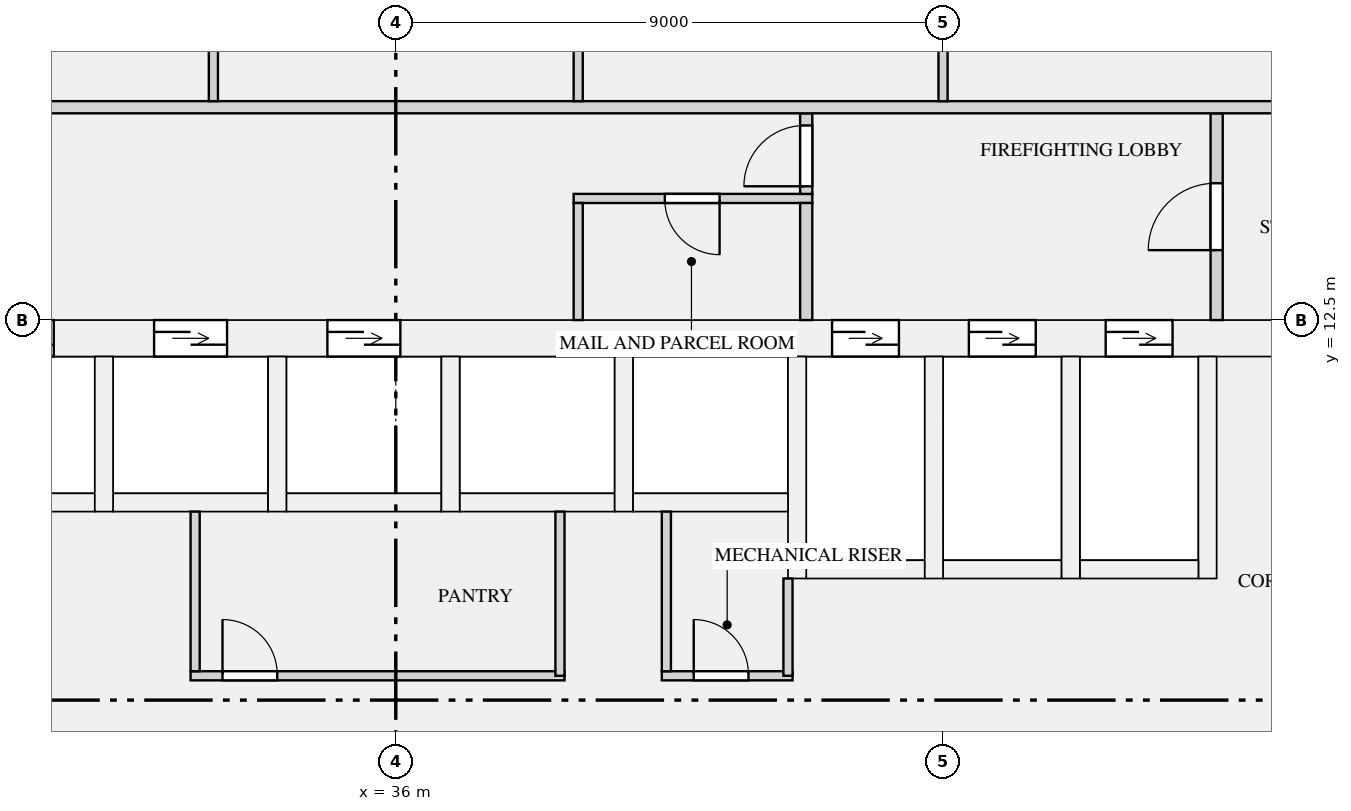
"""IFC4 building model, lengths in metres.
Left out: names, types, materials, properties, quantities, classifications, styles, units other than length and angle.
Written with IfcOpenShell. Run it as: python <this file> out.ifc"""

import sys

from ifc_helpers import new_model, si_unit, direction, frame, frame_2d, origin, place, context, subcontext, project, spatial, rectangle, extrude, element, fill, save


model = new_model("IFC4")
c1 = context("Model", 3, precision=1e-05, world=origin(), true_north=direction((0.0, 1.0)))
c2 = subcontext(c1, "Body", "Model", "MODEL_VIEW")
j1 = project(units=[si_unit("LENGTHUNIT", "METRE"), si_unit("PLANEANGLEUNIT", "RADIAN")], contexts=[c1])
p1 = place(None, origin())
s1 = spatial("IfcSite", under=j1, at=p1, CompositionType="ELEMENT")
p2 = place(p1, origin())
s2 = spatial("IfcBuilding", under=s1, at=p2, CompositionType="ELEMENT")
p3 = place(p2, frame((0.0, 0.0, 19.5)))
s3 = spatial("IfcBuildingStorey", under=s2, at=p3, CompositionType="ELEMENT", Elevation=19.5)
p4 = place(p3, frame((19.0, 12.2, 0.0), z_axis=(0.0, 0.0, 1.0), x_axis=(1.0, 0.0, 0.0)))
e1 = element("IfcWall", 1, at=p4, inside=s3, PredefinedType="SHEAR", context=c2, shape_type="SweptSolid", body=[
    extrude(rectangle(XDim=34.0, YDim=0.6, at=frame_2d((17.0, 0.0))), origin(), (0.0, 0.0, 1.0), 3.15),
])
p5 = place(p4, frame((4.475, 0.0, 0.0)))
e2 = element("IfcOpeningElement", 2, at=p5, cuts=e1, PredefinedType="OPENING", context=c2, shape_type="SweptSolid", body=[
    extrude(rectangle(XDim=1.2, YDim=2.1, at=frame_2d((0.6, 1.05))), frame((0.0, 0.31, 0.0), z_axis=(0.0, -1.0, 0.0), x_axis=(1.0, 0.0, 0.0)), (0.0, 0.0, 1.0), 0.62),
])
p6 = place(p4, frame((7.325, 0.0, 0.0)))
e3 = element("IfcOpeningElement", 3, at=p6, cuts=e1, PredefinedType="OPENING", context=c2, shape_type="SweptSolid", body=[
    extrude(rectangle(XDim=1.2, YDim=2.1, at=frame_2d((0.6, 1.05))), frame((0.0, 0.31, 0.0), z_axis=(0.0, -1.0, 0.0), x_axis=(1.0, 0.0, 0.0)), (0.0, 0.0, 1.0), 0.62),
])
p7 = place(p4, frame((10.175, 0.0, 0.0)))
e4 = element("IfcOpeningElement", 4, at=p7, cuts=e1, PredefinedType="OPENING", context=c2, shape_type="SweptSolid", body=[
    extrude(rectangle(XDim=1.2, YDim=2.1, at=frame_2d((0.6, 1.05))), frame((0.0, 0.31, 0.0), z_axis=(0.0, -1.0, 0.0), x_axis=(1.0, 0.0, 0.0)), (0.0, 0.0, 1.0), 0.62),
])
p8 = place(p4, frame((13.025, 0.0, 0.0)))
e5 = element("IfcOpeningElement", 5, at=p8, cuts=e1, PredefinedType="OPENING", context=c2, shape_type="SweptSolid", body=[
    extrude(rectangle(XDim=1.2, YDim=2.1, at=frame_2d((0.6, 1.05))), frame((0.0, 0.31, 0.0), z_axis=(0.0, -1.0, 0.0), x_axis=(1.0, 0.0, 0.0)), (0.0, 0.0, 1.0), 0.62),
])
p9 = place(p4, frame((15.875, 0.0, 0.0)))
e6 = element("IfcOpeningElement", 6, at=p9, cuts=e1, PredefinedType="OPENING", context=c2, shape_type="SweptSolid", body=[
    extrude(rectangle(XDim=1.2, YDim=2.1, at=frame_2d((0.6, 1.05))), frame((0.0, 0.31, 0.0), z_axis=(0.0, -1.0, 0.0), x_axis=(1.0, 0.0, 0.0)), (0.0, 0.0, 1.0), 0.62),
])
p10 = place(p4, frame((24.175, 0.0, 0.0)))
e7 = element("IfcOpeningElement", 7, at=p10, cuts=e1, PredefinedType="OPENING", context=c2, shape_type="SweptSolid", body=[
    extrude(rectangle(XDim=1.1, YDim=2.1, at=frame_2d((0.55, 1.05))), frame((0.0, 0.31, 0.0), z_axis=(0.0, -1.0, 0.0), x_axis=(1.0, 0.0, 0.0)), (0.0, 0.0, 1.0), 0.62),
])
p11 = place(p4, frame((26.425, 0.0, 0.0)))
e8 = element("IfcOpeningElement", 8, at=p11, cuts=e1, PredefinedType="OPENING", context=c2, shape_type="SweptSolid", body=[
    extrude(rectangle(XDim=1.1, YDim=2.1, at=frame_2d((0.55, 1.05))), frame((0.0, 0.31, 0.0), z_axis=(0.0, -1.0, 0.0), x_axis=(1.0, 0.0, 0.0)), (0.0, 0.0, 1.0), 0.62),
])
p12 = place(p4, frame((28.675, 0.0, 0.0)))
e9 = element("IfcOpeningElement", 9, at=p12, cuts=e1, PredefinedType="OPENING", context=c2, shape_type="SweptSolid", body=[
    extrude(rectangle(XDim=1.1, YDim=2.1, at=frame_2d((0.55, 1.05))), frame((0.0, 0.31, 0.0), z_axis=(0.0, -1.0, 0.0), x_axis=(1.0, 0.0, 0.0)), (0.0, 0.0, 1.0), 0.62),
])
p13 = place(p4, frame((1.15, 0.0, 0.0)))
e10 = element("IfcOpeningElement", 10, at=p13, cuts=e1, PredefinedType="OPENING", context=c2, shape_type="SweptSolid", body=[
    extrude(rectangle(XDim=1.2, YDim=2.1, at=frame_2d((0.6, 1.05))), frame((0.0, 0.31, 0.0), z_axis=(0.0, -1.0, 0.0), x_axis=(1.0, 0.0, 0.0)), (0.0, 0.0, 1.0), 0.62),
])
p14 = place(p4, frame((31.65, 0.0, 0.0)))
e11 = element("IfcOpeningElement", 11, at=p14, cuts=e1, PredefinedType="OPENING", context=c2, shape_type="SweptSolid", body=[
    extrude(rectangle(XDim=1.2, YDim=2.1, at=frame_2d((0.6, 1.05))), frame((0.0, 0.31, 0.0), z_axis=(0.0, -1.0, 0.0), x_axis=(1.0, 0.0, 0.0)), (0.0, 0.0, 1.0), 0.62),
])
p15 = place(p3, frame((28.5, 9.5, 0.0), z_axis=(0.0, 0.0, 1.0), x_axis=(1.0, 0.0, 0.0)))
e12 = element("IfcWall", 12, at=p15, inside=s3, PredefinedType="SHEAR", context=c2, shape_type="SweptSolid", body=[
    extrude(rectangle(XDim=2.55, YDim=0.3, at=frame_2d((1.275, 0.0))), origin(), (0.0, 0.0, 1.0), 3.15),
])
for number, where, z_axis, x_axis in (
    (13, (31.35, 9.5, 0.0), (0.0, 0.0, 1.0), (1.0, 0.0, 0.0)),
    (14, (31.2, 9.35, 0.0), (0.0, 0.0, 1.0), (0.0, 1.0, 0.0)),
):
    element("IfcWall", number, at=place(p3, frame(where, z_axis=z_axis, x_axis=x_axis)), inside=s3, PredefinedType="SHEAR", context=c2, shape_type="SweptSolid", body=[
        extrude(rectangle(XDim=2.55, YDim=0.3, at=frame_2d((1.275, 0.0))), origin(), (0.0, 0.0, 1.0), 3.15),
    ])
p16 = place(p3, frame((34.2, 9.5, 0.0), z_axis=(0.0, 0.0, 1.0), x_axis=(1.0, 0.0, 0.0)))
e15 = element("IfcWall", 15, at=p16, inside=s3, PredefinedType="SHEAR", context=c2, shape_type="SweptSolid", body=[
    extrude(rectangle(XDim=2.55, YDim=0.3, at=frame_2d((1.275, 0.0))), origin(), (0.0, 0.0, 1.0), 3.15),
])
p17 = place(p3, frame((34.05, 9.35, 0.0), z_axis=(0.0, 0.0, 1.0), x_axis=(0.0, 1.0, 0.0)))
e16 = element("IfcWall", 16, at=p17, inside=s3, PredefinedType="SHEAR", context=c2, shape_type="SweptSolid", body=[
    extrude(rectangle(XDim=2.55, YDim=0.3, at=frame_2d((1.275, 0.0))), origin(), (0.0, 0.0, 1.0), 3.15),
])
p18 = place(p3, frame((37.05, 9.5, 0.0), z_axis=(0.0, 0.0, 1.0), x_axis=(1.0, 0.0, 0.0)))
e17 = element("IfcWall", 17, at=p18, inside=s3, PredefinedType="SHEAR", context=c2, shape_type="SweptSolid", body=[
    extrude(rectangle(XDim=2.55, YDim=0.3, at=frame_2d((1.275, 0.0))), origin(), (0.0, 0.0, 1.0), 3.15),
])
p19 = place(p3, frame((36.9, 9.35, 0.0), z_axis=(0.0, 0.0, 1.0), x_axis=(0.0, 1.0, 0.0)))
e18 = element("IfcWall", 18, at=p19, inside=s3, PredefinedType="SHEAR", context=c2, shape_type="SweptSolid", body=[
    extrude(rectangle(XDim=2.55, YDim=0.3, at=frame_2d((1.275, 0.0))), origin(), (0.0, 0.0, 1.0), 3.15),
])
p20 = place(p3, frame((39.9, 9.5, 0.0), z_axis=(0.0, 0.0, 1.0), x_axis=(1.0, 0.0, 0.0)))
e19 = element("IfcWall", 19, at=p20, inside=s3, PredefinedType="SHEAR", context=c2, shape_type="SweptSolid", body=[
    extrude(rectangle(XDim=2.55, YDim=0.3, at=frame_2d((1.275, 0.0))), origin(), (0.0, 0.0, 1.0), 3.15),
])
p21 = place(p3, frame((39.75, 9.35, 0.0), z_axis=(0.0, 0.0, 1.0), x_axis=(0.0, 1.0, 0.0)))
e20 = element("IfcWall", 20, at=p21, inside=s3, PredefinedType="SHEAR", context=c2, shape_type="SweptSolid", body=[
    extrude(rectangle(XDim=2.55, YDim=0.3, at=frame_2d((1.275, 0.0))), origin(), (0.0, 0.0, 1.0), 3.15),
])
p22 = place(p3, frame((42.75, 8.4, 0.0), z_axis=(0.0, 0.0, 1.0), x_axis=(1.0, 0.0, 0.0)))
e21 = element("IfcWall", 21, at=p22, inside=s3, PredefinedType="SHEAR", context=c2, shape_type="SweptSolid", body=[
    extrude(rectangle(XDim=1.95, YDim=0.3, at=frame_2d((0.975, 0.0))), origin(), (0.0, 0.0, 1.0), 3.15),
])
p23 = place(p3, frame((42.6, 8.25, 0.0), z_axis=(0.0, 0.0, 1.0), x_axis=(0.0, 1.0, 0.0)))
e22 = element("IfcWall", 22, at=p23, inside=s3, PredefinedType="SHEAR", context=c2, shape_type="SweptSolid", body=[
    extrude(rectangle(XDim=3.65, YDim=0.3, at=frame_2d((1.825, 0.0))), origin(), (0.0, 0.0, 1.0), 3.15),
])
p24 = place(p3, frame((45.0, 8.4, 0.0), z_axis=(0.0, 0.0, 1.0), x_axis=(1.0, 0.0, 0.0)))
e23 = element("IfcWall", 23, at=p24, inside=s3, PredefinedType="SHEAR", context=c2, shape_type="SweptSolid", body=[
    extrude(rectangle(XDim=1.95, YDim=0.3, at=frame_2d((0.975, 0.0))), origin(), (0.0, 0.0, 1.0), 3.15),
])
p25 = place(p3, frame((44.85, 8.25, 0.0), z_axis=(0.0, 0.0, 1.0), x_axis=(0.0, 1.0, 0.0)))
e24 = element("IfcWall", 24, at=p25, inside=s3, PredefinedType="SHEAR", context=c2, shape_type="SweptSolid", body=[
    extrude(rectangle(XDim=3.65, YDim=0.3, at=frame_2d((1.825, 0.0))), origin(), (0.0, 0.0, 1.0), 3.15),
])
p26 = place(p3, frame((47.25, 8.4, 0.0), z_axis=(0.0, 0.0, 1.0), x_axis=(1.0, 0.0, 0.0)))
e25 = element("IfcWall", 25, at=p26, inside=s3, PredefinedType="SHEAR", context=c2, shape_type="SweptSolid", body=[
    extrude(rectangle(XDim=1.95, YDim=0.3, at=frame_2d((0.975, 0.0))), origin(), (0.0, 0.0, 1.0), 3.15),
])
for number, where, z_axis, x_axis in (
    (26, (47.1, 8.25, 0.0), (0.0, 0.0, 1.0), (0.0, 1.0, 0.0)),
    (27, (49.35, 8.25, 0.0), (0.0, 0.0, 1.0), (0.0, 1.0, 0.0)),
):
    element("IfcWall", number, at=place(p3, frame(where, z_axis=z_axis, x_axis=x_axis)), inside=s3, PredefinedType="SHEAR", context=c2, shape_type="SweptSolid", body=[
        extrude(rectangle(XDim=3.65, YDim=0.3, at=frame_2d((1.825, 0.0))), origin(), (0.0, 0.0, 1.0), 3.15),
    ])
p27 = place(p3, frame((32.625, 6.65, 0.0), z_axis=(0.0, 0.0, 1.0), x_axis=(1.0, 0.0, 0.0)))
e28 = element("IfcWall", 28, at=p27, inside=s3, PredefinedType="PARTITIONING", context=c2, shape_type="SweptSolid", body=[
    extrude(rectangle(XDim=6.15, YDim=0.15, at=frame_2d((3.075, 0.0))), origin(), (0.0, 0.0, 1.0), 2.83),
])
p28 = place(p27, frame((0.525, 0.0, 0.0)))
e29 = element("IfcOpeningElement", 29, at=p28, cuts=e28, PredefinedType="OPENING", context=c2, shape_type="SweptSolid", body=[
    extrude(rectangle(XDim=0.9, YDim=2.1, at=frame_2d((0.45, 1.05))), frame((0.0, 0.085, 0.0), z_axis=(0.0, -1.0, 0.0), x_axis=(1.0, 0.0, 0.0)), (0.0, 0.0, 1.0), 0.17),
])
p29 = place(p3, frame((40.375, 6.65, 0.0), z_axis=(0.0, 0.0, 1.0), x_axis=(1.0, 0.0, 0.0)))
e30 = element("IfcWall", 30, at=p29, inside=s3, PredefinedType="PARTITIONING", context=c2, shape_type="SweptSolid", body=[
    extrude(rectangle(XDim=2.15, YDim=0.15, at=frame_2d((1.075, 0.0))), origin(), (0.0, 0.0, 1.0), 2.83),
])
p30 = place(p29, frame((0.525, 0.0, 0.0)))
e31 = element("IfcOpeningElement", 31, at=p30, cuts=e30, PredefinedType="OPENING", context=c2, shape_type="SweptSolid", body=[
    extrude(rectangle(XDim=0.9, YDim=2.1, at=frame_2d((0.45, 1.05))), frame((0.0, 0.085, 0.0), z_axis=(0.0, -1.0, 0.0), x_axis=(1.0, 0.0, 0.0)), (0.0, 0.0, 1.0), 0.17),
])
p31 = place(p3, frame((38.925, 14.5, 0.0), z_axis=(0.0, 0.0, 1.0), x_axis=(1.0, 0.0, 0.0)))
e32 = element("IfcWall", 32, at=p31, inside=s3, PredefinedType="PARTITIONING", context=c2, shape_type="SweptSolid", body=[
    extrude(rectangle(XDim=3.925, YDim=0.15, at=frame_2d((1.962, 0.0))), origin(), (0.0, 0.0, 1.0), 2.83),
])
p32 = place(p31, frame((1.5, 0.0, 0.0)))
e33 = element("IfcOpeningElement", 33, at=p32, cuts=e32, PredefinedType="OPENING", context=c2, shape_type="SweptSolid", body=[
    extrude(rectangle(XDim=0.9, YDim=2.1, at=frame_2d((0.45, 1.05))), frame((0.0, 0.085, 0.0), z_axis=(0.0, -1.0, 0.0), x_axis=(1.0, 0.0, 0.0)), (0.0, 0.0, 1.0), 0.17),
])
p33 = place(p3, frame((38.7, 6.65, 0.0), z_axis=(0.0, 0.0, 1.0), x_axis=(0.0, 1.0, 0.0)))
e34 = element("IfcWall", 34, at=p33, inside=s3, PredefinedType="PARTITIONING", context=c2, shape_type="SweptSolid", body=[
    extrude(rectangle(XDim=2.7, YDim=0.15, at=frame_2d((1.35, 0.0))), origin(), (0.0, 0.0, 1.0), 2.83),
])
p34 = place(p3, frame((42.45, 6.65, 0.0), z_axis=(0.0, 0.0, 1.0), x_axis=(0.0, 1.0, 0.0)))
e35 = element("IfcWall", 35, at=p34, inside=s3, PredefinedType="PARTITIONING", context=c2, shape_type="SweptSolid", body=[
    extrude(rectangle(XDim=1.6, YDim=0.15, at=frame_2d((0.8, 0.0))), origin(), (0.0, 0.0, 1.0), 2.83),
])
for number, where, z_axis, x_axis in (
    (36, (32.7, 6.725, 0.0), (0.0, 0.0, 1.0), (0.0, 1.0, 0.0)),
    (37, (40.45, 6.725, 0.0), (0.0, 0.0, 1.0), (0.0, 1.0, 0.0)),
):
    element("IfcWall", number, at=place(p3, frame(where, z_axis=z_axis, x_axis=x_axis)), inside=s3, PredefinedType="PARTITIONING", context=c2, shape_type="SweptSolid", body=[
        extrude(rectangle(XDim=2.625, YDim=0.15, at=frame_2d((1.312, 0.0))), origin(), (0.0, 0.0, 1.0), 2.83),
    ])
p35 = place(p3, frame((39.0, 12.5, 0.0), z_axis=(0.0, 0.0, 1.0), x_axis=(0.0, 1.0, 0.0)))
e38 = element("IfcWall", 38, at=p35, inside=s3, PredefinedType="PARTITIONING", context=c2, shape_type="SweptSolid", body=[
    extrude(rectangle(XDim=1.925, YDim=0.15, at=frame_2d((0.962, 0.0))), origin(), (0.0, 0.0, 1.0), 2.83),
])
p36 = place(p3, frame((42.75, 12.5, 0.0), z_axis=(0.0, 0.0, 1.0), x_axis=(0.0, 1.0, 0.0)))
e39 = element("IfcWall", 39, at=p36, inside=s3, PredefinedType="PARTITIONING", context=c2, shape_type="SweptSolid", body=[
    extrude(rectangle(XDim=1.925, YDim=0.2, at=frame_2d((0.962, 0.0))), origin(), (0.0, 0.0, 1.0), 2.83),
])
p37 = place(p3, frame((49.5, 12.5, 0.0), z_axis=(0.0, 0.0, 1.0), x_axis=(0.0, 1.0, 0.0)))
e40 = element("IfcWall", 40, at=p37, inside=s3, PredefinedType="PARTITIONING", context=c2, shape_type="SweptSolid", body=[
    extrude(rectangle(XDim=3.4, YDim=0.2, at=frame_2d((1.7, 0.0))), origin(), (0.0, 0.0, 1.0), 2.83),
])
p38 = place(p37, frame((1.15, 0.0, 0.0)))
e41 = element("IfcOpeningElement", 41, at=p38, cuts=e40, PredefinedType="OPENING", context=c2, shape_type="SweptSolid", body=[
    extrude(rectangle(XDim=1.1, YDim=2.1, at=frame_2d((0.55, 1.05))), frame((0.0, 0.11, 0.0), z_axis=(0.0, -1.0, 0.0), x_axis=(1.0, 0.0, 0.0)), (0.0, 0.0, 1.0), 0.22),
])
p39 = place(p3, frame((42.75, 14.575, 0.0), z_axis=(0.0, 0.0, 1.0), x_axis=(0.0, 1.0, 0.0)))
e42 = element("IfcWall", 42, at=p39, inside=s3, PredefinedType="PARTITIONING", context=c2, shape_type="SweptSolid", body=[
    extrude(rectangle(XDim=1.325, YDim=0.2, at=frame_2d((0.663, 0.0))), origin(), (0.0, 0.0, 1.0), 2.83),
])
p40 = place(p39, frame((0.125, 0.0, 0.0)))
e43 = element("IfcOpeningElement", 43, at=p40, cuts=e42, PredefinedType="OPENING", context=c2, shape_type="SweptSolid", body=[
    extrude(rectangle(XDim=1.0, YDim=2.1, at=frame_2d((0.5, 1.05))), frame((0.0, 0.11, 0.0), z_axis=(0.0, -1.0, 0.0), x_axis=(1.0, 0.0, 0.0)), (0.0, 0.0, 1.0), 0.22),
])
p41 = place(p3, frame((17.9, 16.0, 0.0), z_axis=(0.0, 0.0, 1.0), x_axis=(1.0, 0.0, 0.0)))
e44 = element("IfcWall", 44, at=p41, inside=s3, PredefinedType="PARTITIONING", context=c2, shape_type="SweptSolid", body=[
    extrude(rectangle(XDim=36.2, YDim=0.2, at=frame_2d((18.1, 0.0))), origin(), (0.0, 0.0, 1.0), 2.83),
])
p42 = place(p41, frame((0.9, 0.0, 0.0)))
e45 = element("IfcOpeningElement", 45, at=p42, cuts=e44, PredefinedType="OPENING", context=c2, shape_type="SweptSolid", body=[
    extrude(rectangle(XDim=1.4, YDim=2.1, at=frame_2d((0.7, 1.05))), frame((0.0, 0.11, 0.0), z_axis=(0.0, -1.0, 0.0), x_axis=(1.0, 0.0, 0.0)), (0.0, 0.0, 1.0), 0.22),
])
p43 = place(p41, frame((33.9, 0.0, 0.0)))
e46 = element("IfcOpeningElement", 46, at=p43, cuts=e44, PredefinedType="OPENING", context=c2, shape_type="SweptSolid", body=[
    extrude(rectangle(XDim=1.4, YDim=2.1, at=frame_2d((0.7, 1.05))), frame((0.0, 0.11, 0.0), z_axis=(0.0, -1.0, 0.0), x_axis=(1.0, 0.0, 0.0)), (0.0, 0.0, 1.0), 0.22),
])
for number, where, z_axis, x_axis in (
    (47, (33.0, 16.1, 0.0), (0.0, 0.0, 1.0), (0.0, 1.0, 0.0)),
    (48, (39.0, 16.1, 0.0), (0.0, 0.0, 1.0), (0.0, 1.0, 0.0)),
    (49, (45.0, 16.1, 0.0), (0.0, 0.0, 1.0), (0.0, 1.0, 0.0)),
):
    element("IfcWall", number, at=place(p3, frame(where, z_axis=z_axis, x_axis=x_axis)), inside=s3, PredefinedType="PARTITIONING", context=c2, shape_type="SweptSolid", body=[
        extrude(rectangle(XDim=4.825, YDim=0.15, at=frame_2d((2.413, 0.0))), origin(), (0.0, 0.0, 1.0), 2.83),
    ])
p44 = place(p7, origin())
e50 = element("IfcDoor", 50, at=p44, inside=s3, OperationType="DOUBLE_DOOR_SLIDING", PredefinedType="DOOR", context=c2, shape_type="SweptSolid", body=[
    extrude(rectangle(XDim=1.2, YDim=2.1, at=frame_2d((0.6, 1.05))), frame((0.0, 0.025, 0.0), z_axis=(0.0, -1.0, 0.0), x_axis=(1.0, 0.0, 0.0)), (0.0, 0.0, 1.0), 0.05),
])
fill(e4, e50)
p45 = place(p8, origin())
e51 = element("IfcDoor", 51, at=p45, inside=s3, OperationType="DOUBLE_DOOR_SLIDING", PredefinedType="DOOR", context=c2, shape_type="SweptSolid", body=[
    extrude(rectangle(XDim=1.2, YDim=2.1, at=frame_2d((0.6, 1.05))), frame((0.0, 0.025, 0.0), z_axis=(0.0, -1.0, 0.0), x_axis=(1.0, 0.0, 0.0)), (0.0, 0.0, 1.0), 0.05),
])
fill(e5, e51)
p46 = place(p9, origin())
e52 = element("IfcDoor", 52, at=p46, inside=s3, OperationType="DOUBLE_DOOR_SLIDING", PredefinedType="DOOR", context=c2, shape_type="SweptSolid", body=[
    extrude(rectangle(XDim=1.2, YDim=2.1, at=frame_2d((0.6, 1.05))), frame((0.0, 0.025, 0.0), z_axis=(0.0, -1.0, 0.0), x_axis=(1.0, 0.0, 0.0)), (0.0, 0.0, 1.0), 0.05),
])
fill(e6, e52)
p47 = place(p10, origin())
e53 = element("IfcDoor", 53, at=p47, inside=s3, OperationType="DOUBLE_DOOR_SLIDING", PredefinedType="DOOR", context=c2, shape_type="SweptSolid", body=[
    extrude(rectangle(XDim=1.1, YDim=2.1, at=frame_2d((0.55, 1.05))), frame((0.0, 0.025, 0.0), z_axis=(0.0, -1.0, 0.0), x_axis=(1.0, 0.0, 0.0)), (0.0, 0.0, 1.0), 0.05),
])
fill(e7, e53)
p48 = place(p11, origin())
e54 = element("IfcDoor", 54, at=p48, inside=s3, OperationType="DOUBLE_DOOR_SLIDING", PredefinedType="DOOR", context=c2, shape_type="SweptSolid", body=[
    extrude(rectangle(XDim=1.1, YDim=2.1, at=frame_2d((0.55, 1.05))), frame((0.0, 0.025, 0.0), z_axis=(0.0, -1.0, 0.0), x_axis=(1.0, 0.0, 0.0)), (0.0, 0.0, 1.0), 0.05),
])
fill(e8, e54)
p49 = place(p12, origin())
e55 = element("IfcDoor", 55, at=p49, inside=s3, OperationType="DOUBLE_DOOR_SLIDING", PredefinedType="DOOR", context=c2, shape_type="SweptSolid", body=[
    extrude(rectangle(XDim=1.1, YDim=2.1, at=frame_2d((0.55, 1.05))), frame((0.0, 0.025, 0.0), z_axis=(0.0, -1.0, 0.0), x_axis=(1.0, 0.0, 0.0)), (0.0, 0.0, 1.0), 0.05),
])
fill(e9, e55)
p50 = place(p28, origin())
e56 = element("IfcDoor", 56, at=p50, inside=s3, OperationType="SINGLE_SWING_LEFT", PredefinedType="DOOR", context=c2, shape_type="SweptSolid", body=[
    extrude(rectangle(XDim=0.9, YDim=2.1, at=frame_2d((0.45, 1.05))), frame((0.0, 0.025, 0.0), z_axis=(0.0, -1.0, 0.0), x_axis=(1.0, 0.0, 0.0)), (0.0, 0.0, 1.0), 0.05),
])
fill(e29, e56)
p51 = place(p30, origin())
e57 = element("IfcDoor", 57, at=p51, inside=s3, OperationType="SINGLE_SWING_LEFT", PredefinedType="DOOR", context=c2, shape_type="SweptSolid", body=[
    extrude(rectangle(XDim=0.9, YDim=2.1, at=frame_2d((0.45, 1.05))), frame((0.0, 0.025, 0.0), z_axis=(0.0, -1.0, 0.0), x_axis=(1.0, 0.0, 0.0)), (0.0, 0.0, 1.0), 0.05),
])
fill(e31, e57)
p52 = place(p32, frame((0.9, 0.0, 0.0), z_axis=(0.0, 0.0, 1.0), x_axis=(-1.0, 0.0, 0.0)))
e58 = element("IfcDoor", 58, at=p52, inside=s3, OperationType="SINGLE_SWING_LEFT", PredefinedType="DOOR", context=c2, shape_type="SweptSolid", body=[
    extrude(rectangle(XDim=0.9, YDim=2.1, at=frame_2d((0.45, 1.05))), frame((0.0, 0.025, 0.0), z_axis=(0.0, -1.0, 0.0), x_axis=(1.0, 0.0, 0.0)), (0.0, 0.0, 1.0), 0.05),
])
fill(e33, e58)
p53 = place(p40, origin())
e59 = element("IfcDoor", 59, at=p53, inside=s3, OperationType="SINGLE_SWING_LEFT", PredefinedType="DOOR", context=c2, shape_type="SweptSolid", body=[
    extrude(rectangle(XDim=1.0, YDim=2.1, at=frame_2d((0.5, 1.05))), frame((0.0, 0.025, 0.0), z_axis=(0.0, -1.0, 0.0), x_axis=(1.0, 0.0, 0.0)), (0.0, 0.0, 1.0), 0.05),
])
fill(e43, e59)
p54 = place(p38, origin())
e60 = element("IfcDoor", 60, at=p54, inside=s3, OperationType="SINGLE_SWING_LEFT", PredefinedType="DOOR", context=c2, shape_type="SweptSolid", body=[
    extrude(rectangle(XDim=1.1, YDim=2.1, at=frame_2d((0.55, 1.05))), frame((0.0, 0.025, 0.0), z_axis=(0.0, -1.0, 0.0), x_axis=(1.0, 0.0, 0.0)), (0.0, 0.0, 1.0), 0.05),
])
fill(e41, e60)
save(model, sys.argv[1])
